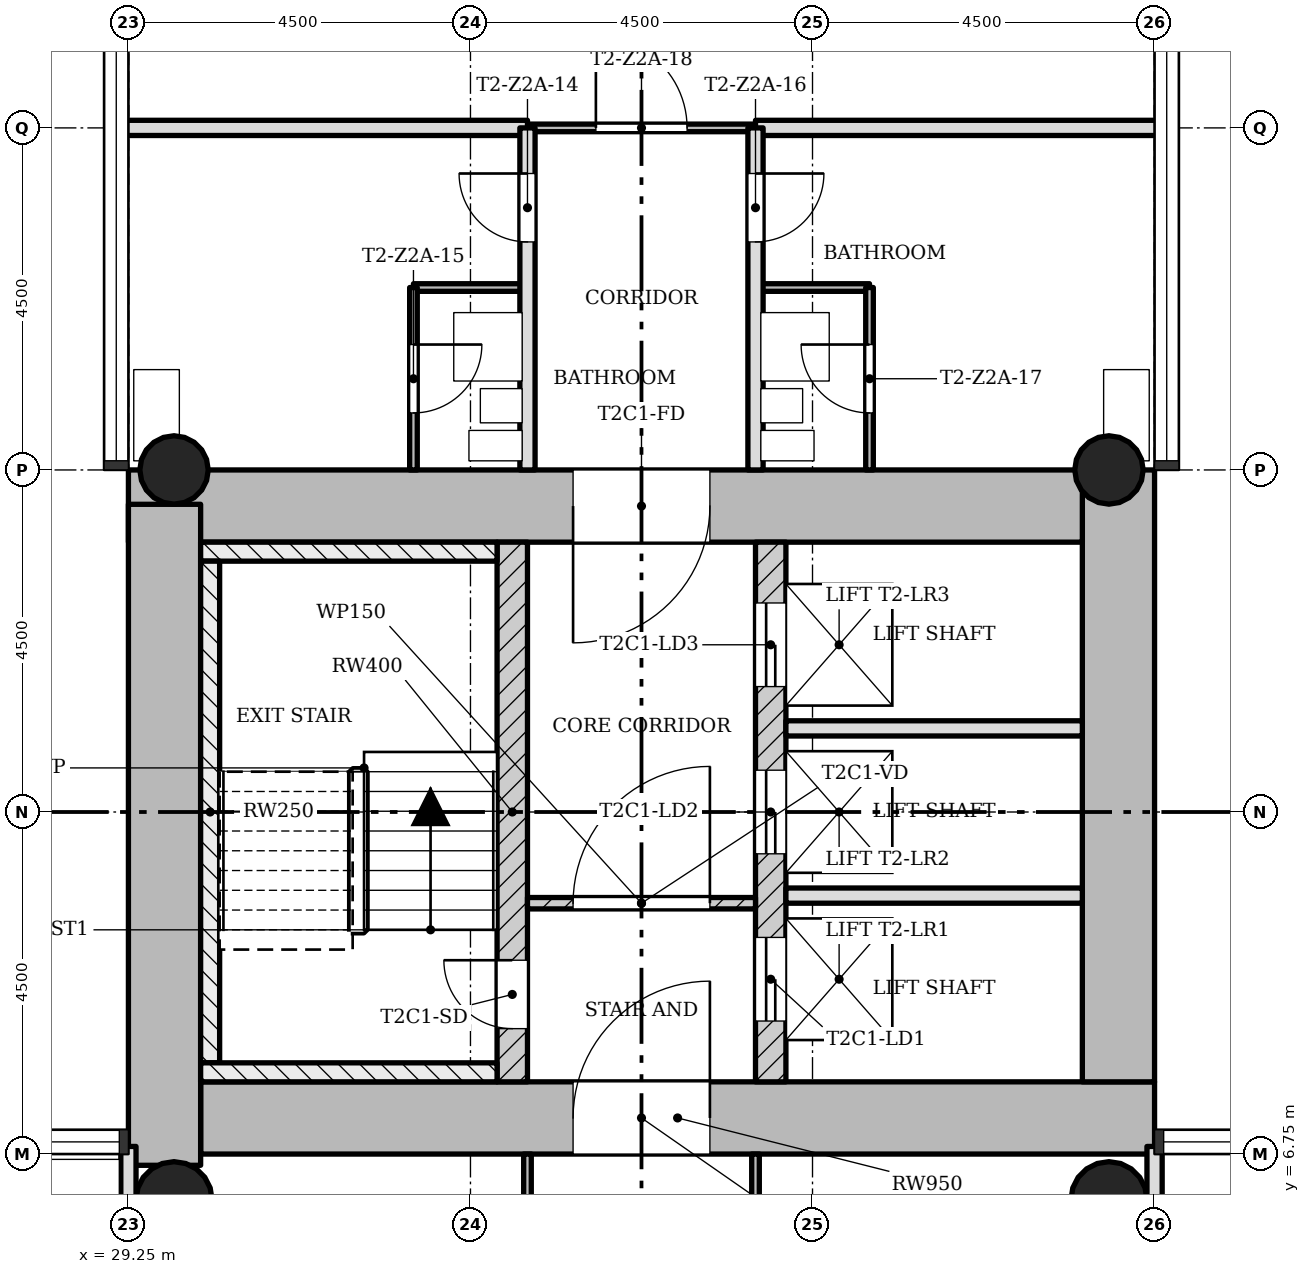
"""IFC4 building model, lengths in metres.
Left out: names, types, materials, properties, quantities, classifications, styles, units other than length and angle.
Written with IfcOpenShell. Run it as: python <this file> out.ifc"""

import sys

from ifc_helpers import new_model, si_unit, direction, frame, frame_2d, origin, origin_2d, place, context, subcontext, project, spatial, rectangle, hollow_circle, extrude, element, fill, save


model = new_model("IFC4")
c1 = context("Model", 3, precision=1e-05, world=origin(), true_north=direction((0.0, 1.0)))
c2 = subcontext(c1, "Body", "Model", "MODEL_VIEW")
j1 = project(units=[si_unit("LENGTHUNIT", "METRE"), si_unit("PLANEANGLEUNIT", "RADIAN")], contexts=[c1])
p1 = place(None, origin())
s1 = spatial("IfcSite", under=j1, at=p1, CompositionType="ELEMENT")
p2 = place(p1, origin())
s2 = spatial("IfcBuilding", under=s1, at=p2, CompositionType="ELEMENT")
p3 = place(p2, frame((0.0, 0.0, 117.4)))
s3 = spatial("IfcBuildingStorey", under=s2, at=p3, CompositionType="ELEMENT", Elevation=117.4)
p4 = place(p3, frame((30.2, 7.225, 0.0), z_axis=(0.0, 0.0, 1.0), x_axis=(1.0, 0.0, 0.0)))
e1 = element("IfcWall", 1, at=p4, inside=s3, PredefinedType="SHEAR", context=c2, shape_type="SweptSolid", body=[
    extrude(rectangle(XDim=12.55, YDim=0.95, at=frame_2d((6.275, 0.0))), origin(), (0.0, 0.0, 1.0), 3.4),
])
p5 = place(p4, frame((4.9, 0.0, 0.0)))
e2 = element("IfcOpeningElement", 2, at=p5, cuts=e1, PredefinedType="OPENING", context=c2, shape_type="SweptSolid", body=[
    extrude(rectangle(XDim=1.8, YDim=2.1, at=frame_2d((0.9, 1.05))), frame((0.0, 0.485, 0.0), z_axis=(0.0, -1.0, 0.0), x_axis=(1.0, 0.0, 0.0)), (0.0, 0.0, 1.0), 0.97),
])
p6 = place(p3, frame((42.275, 7.7, 0.0), z_axis=(0.0, 0.0, 1.0), x_axis=(0.0, 1.0, 0.0)))
e3 = element("IfcWall", 3, at=p6, inside=s3, PredefinedType="SHEAR", context=c2, shape_type="SweptSolid", body=[
    extrude(rectangle(XDim=8.05, YDim=0.95, at=frame_2d((4.025, 0.0))), origin(), (0.0, 0.0, 1.0), 3.4),
])
p7 = place(p3, frame((41.8, 15.275, 0.0), z_axis=(0.0, 0.0, 1.0), x_axis=(-1.0, 0.0, 0.0)))
e4 = element("IfcWall", 4, at=p7, inside=s3, PredefinedType="SHEAR", context=c2, shape_type="SweptSolid", body=[
    extrude(rectangle(XDim=12.55, YDim=0.95, at=frame_2d((6.275, 0.0))), origin(), (0.0, 0.0, 1.0), 3.4),
])
p8 = place(p7, frame((4.9, 0.0, 0.0)))
e5 = element("IfcOpeningElement", 5, at=p8, cuts=e4, PredefinedType="OPENING", context=c2, shape_type="SweptSolid", body=[
    extrude(rectangle(XDim=1.8, YDim=2.1, at=frame_2d((0.9, 1.05))), frame((0.0, 0.485, 0.0), z_axis=(0.0, -1.0, 0.0), x_axis=(1.0, 0.0, 0.0)), (0.0, 0.0, 1.0), 0.97),
])
p9 = place(p3, frame((29.725, 15.298, 0.0), z_axis=(0.0, 0.0, 1.0), x_axis=(0.0, -1.0, 0.0)))
e6 = element("IfcWall", 6, at=p9, inside=s3, PredefinedType="SHEAR", context=c2, shape_type="SweptSolid", body=[
    extrude(rectangle(XDim=8.696, YDim=0.95, at=frame_2d((4.348, 0.0))), origin(), (0.0, 0.0, 1.0), 3.4),
])
p10 = place(p3, frame((34.3, 7.7, 0.0), z_axis=(0.0, 0.0, 1.0), x_axis=(0.0, 1.0, 0.0)))
e7 = element("IfcWall", 7, at=p10, inside=s3, PredefinedType="SHEAR", context=c2, shape_type="SweptSolid", body=[
    extrude(rectangle(XDim=7.1, YDim=0.4, at=frame_2d((3.55, 0.0))), origin(), (0.0, 0.0, 1.0), 3.4),
])
p11 = place(p10, frame((0.7, 0.0, 0.0)))
e8 = element("IfcOpeningElement", 8, at=p11, cuts=e7, PredefinedType="OPENING", context=c2, shape_type="SweptSolid", body=[
    extrude(rectangle(XDim=0.9, YDim=2.1, at=frame_2d((0.45, 1.05))), frame((0.0, 0.21, 0.0), z_axis=(0.0, -1.0, 0.0), x_axis=(1.0, 0.0, 0.0)), (0.0, 0.0, 1.0), 0.42),
])
p12 = place(p3, frame((37.7, 7.7, 0.0), z_axis=(0.0, 0.0, 1.0), x_axis=(0.0, 1.0, 0.0)))
e9 = element("IfcWall", 9, at=p12, inside=s3, PredefinedType="SHEAR", context=c2, shape_type="SweptSolid", body=[
    extrude(rectangle(XDim=7.1, YDim=0.4, at=frame_2d((3.55, 0.0))), origin(), (0.0, 0.0, 1.0), 3.4),
])
p13 = place(p12, frame((0.8, 0.0, 0.0)))
e10 = element("IfcOpeningElement", 10, at=p13, cuts=e9, PredefinedType="OPENING", context=c2, shape_type="SweptSolid", body=[
    extrude(rectangle(XDim=1.1, YDim=2.1, at=frame_2d((0.55, 1.05))), frame((0.0, 0.21, 0.0), z_axis=(0.0, -1.0, 0.0), x_axis=(1.0, 0.0, 0.0)), (0.0, 0.0, 1.0), 0.42),
])
p14 = place(p12, frame((3.0, 0.0, 0.0)))
e11 = element("IfcOpeningElement", 11, at=p14, cuts=e9, PredefinedType="OPENING", context=c2, shape_type="SweptSolid", body=[
    extrude(rectangle(XDim=1.1, YDim=2.1, at=frame_2d((0.55, 1.05))), frame((0.0, 0.21, 0.0), z_axis=(0.0, -1.0, 0.0), x_axis=(1.0, 0.0, 0.0)), (0.0, 0.0, 1.0), 0.42),
])
p15 = place(p12, frame((5.2, 0.0, 0.0)))
e12 = element("IfcOpeningElement", 12, at=p15, cuts=e9, PredefinedType="OPENING", context=c2, shape_type="SweptSolid", body=[
    extrude(rectangle(XDim=1.1, YDim=2.1, at=frame_2d((0.55, 1.05))), frame((0.0, 0.21, 0.0), z_axis=(0.0, -1.0, 0.0), x_axis=(1.0, 0.0, 0.0)), (0.0, 0.0, 1.0), 0.42),
])
for number, where, z_axis, x_axis in (
    (13, (42.15, 15.75, 0.0), (0.0, 0.0, 1.0), (1.0, 0.0, 0.0)),
    (14, (29.85, 15.75, 0.0), (0.0, 0.0, 1.0), (1.0, 0.0, 0.0)),
):
    element("IfcColumn", number, at=place(p3, frame(where, z_axis=z_axis, x_axis=x_axis)), inside=s3, PredefinedType="COLUMN", context=c2, shape_type="SweptSolid", body=[
        extrude(hollow_circle(Radius=0.45, WallThickness=0.032, at=origin_2d()), origin(), (0.0, 0.0, 1.0), 3.4),
    ])
for number, where, z_axis, x_axis in (
    (15, (42.15, 6.15, 0.0), (0.0, 0.0, 1.0), (1.0, 0.0, 0.0)),
    (16, (29.85, 6.15, 0.0), (0.0, 0.0, 1.0), (1.0, 0.0, 0.0)),
):
    element("IfcColumn", number, at=place(p3, frame(where, z_axis=z_axis, x_axis=x_axis)), inside=s3, PredefinedType="COLUMN", context=c2, shape_type="SweptSolid", body=[
        extrude(hollow_circle(Radius=0.5, WallThickness=0.036, at=origin_2d()), origin(), (0.0, 0.0, 1.0), 3.4),
    ])
p16 = place(p3, frame((37.5, 10.05, 0.0), z_axis=(0.0, 0.0, 1.0), x_axis=(-1.0, 0.0, 0.0)))
e17 = element("IfcWall", 17, at=p16, inside=s3, PredefinedType="PARTITIONING", context=c2, shape_type="SweptSolid", body=[
    extrude(rectangle(XDim=3.0, YDim=0.15, at=frame_2d((1.5, 0.0))), origin(), (0.0, 0.0, 1.0), 3.0),
])
p17 = place(p16, frame((0.6, 0.0, 0.0)))
e18 = element("IfcOpeningElement", 18, at=p17, cuts=e17, PredefinedType="OPENING", context=c2, shape_type="SweptSolid", body=[
    extrude(rectangle(XDim=1.8, YDim=2.1, at=frame_2d((0.9, 1.05))), frame((0.0, 0.085, 0.0), z_axis=(0.0, -1.0, 0.0), x_axis=(1.0, 0.0, 0.0)), (0.0, 0.0, 1.0), 0.17),
])
for number, where, z_axis, x_axis in (
    (19, (41.8, 10.15, 0.0), (0.0, 0.0, 1.0), (-1.0, 0.0, 0.0)),
    (20, (41.8, 12.35, 0.0), (0.0, 0.0, 1.0), (-1.0, 0.0, 0.0)),
):
    element("IfcWall", number, at=place(p3, frame(where, z_axis=z_axis, x_axis=x_axis)), inside=s3, PredefinedType="SOLIDWALL", context=c2, shape_type="SweptSolid", body=[
        extrude(rectangle(XDim=3.9, YDim=0.2, at=frame_2d((1.95, 0.0))), origin(), (0.0, 0.0, 1.0), 3.0),
    ])
for number, where, z_axis, x_axis in (
    (21, (39.0, 18.15, 0.0), (0.0, 0.0, 1.0), (-1.0, 0.0, 0.0)),
    (22, (34.5, 18.15, 0.0), (0.0, 0.0, 1.0), (-1.0, 0.0, 0.0)),
):
    element("IfcWall", number, at=place(p3, frame(where, z_axis=z_axis, x_axis=x_axis)), inside=s3, PredefinedType="PARTITIONING", context=c2, shape_type="SweptSolid", body=[
        extrude(rectangle(XDim=1.5, YDim=0.1, at=frame_2d((0.75, 0.0))), origin(), (0.0, 0.0, 1.0), 3.0),
    ])
p18 = place(p3, frame((37.5, 20.25, 0.0), z_axis=(0.0, 0.0, 1.0), x_axis=(-1.0, 0.0, 0.0)))
e23 = element("IfcWall", 23, at=p18, inside=s3, PredefinedType="PARTITIONING", context=c2, shape_type="SweptSolid", body=[
    extrude(rectangle(XDim=3.0, YDim=0.1, at=frame_2d((1.5, 0.0))), origin(), (0.0, 0.0, 1.0), 3.0),
])
p19 = place(p18, frame((0.9, 0.0, 0.0)))
e24 = element("IfcOpeningElement", 24, at=p19, cuts=e23, PredefinedType="OPENING", context=c2, shape_type="SweptSolid", body=[
    extrude(rectangle(XDim=1.2, YDim=2.1, at=frame_2d((0.6, 1.05))), frame((0.0, 0.06, 0.0), z_axis=(0.0, -1.0, 0.0), x_axis=(1.0, 0.0, 0.0)), (0.0, 0.0, 1.0), 0.12),
])
for number, where, z_axis, x_axis in (
    (25, (42.85, 20.25, 0.0), (0.0, 0.0, 1.0), (-1.0, 0.0, 0.0)),
    (26, (34.5, 20.25, 0.0), (0.0, 0.0, 1.0), (-1.0, 0.0, 0.0)),
):
    element("IfcWall", number, at=place(p3, frame(where, z_axis=z_axis, x_axis=x_axis)), inside=s3, PredefinedType="SOLIDWALL", context=c2, shape_type="SweptSolid", body=[
        extrude(rectangle(XDim=5.35, YDim=0.2, at=frame_2d((2.675, 0.0))), origin(), (0.0, 0.0, 1.0), 3.0),
    ])
p20 = place(p3, frame((42.75, 0.9, 0.0), z_axis=(0.0, 0.0, 1.0), x_axis=(0.0, 1.0, 0.0)))
e27 = element("IfcWall", 27, at=p20, inside=s3, PredefinedType="SOLIDWALL", context=c2, shape_type="SweptSolid", body=[
    extrude(rectangle(XDim=5.95, YDim=0.2, at=frame_2d((2.975, 0.0))), origin(), (0.0, 0.0, 1.0), 3.0),
])
p21 = place(p3, frame((39.0, 15.75, 0.0), z_axis=(0.0, 0.0, 1.0), x_axis=(0.0, 1.0, 0.0)))
e28 = element("IfcWall", 28, at=p21, inside=s3, PredefinedType="PARTITIONING", context=c2, shape_type="SweptSolid", body=[
    extrude(rectangle(XDim=2.4, YDim=0.1, at=frame_2d((1.2, 0.0))), origin(), (0.0, 0.0, 1.0), 3.0),
])
p22 = place(p21, frame((0.75, 0.0, 0.0)))
e29 = element("IfcOpeningElement", 29, at=p22, cuts=e28, PredefinedType="OPENING", context=c2, shape_type="SweptSolid", body=[
    extrude(rectangle(XDim=0.9, YDim=2.1, at=frame_2d((0.45, 1.05))), frame((0.0, 0.06, 0.0), z_axis=(0.0, -1.0, 0.0), x_axis=(1.0, 0.0, 0.0)), (0.0, 0.0, 1.0), 0.12),
])
p23 = place(p3, frame((37.5, 0.9, 0.0), z_axis=(0.0, 0.0, 1.0), x_axis=(0.0, 1.0, 0.0)))
e30 = element("IfcWall", 30, at=p23, inside=s3, PredefinedType="PARTITIONING", context=c2, shape_type="SweptSolid", body=[
    extrude(rectangle(XDim=5.85, YDim=0.1, at=frame_2d((2.925, 0.0))), origin(), (0.0, 0.0, 1.0), 3.0),
])
p24 = place(p23, frame((2.475, 0.0, 0.0)))
e31 = element("IfcOpeningElement", 31, at=p24, cuts=e30, PredefinedType="OPENING", context=c2, shape_type="SweptSolid", body=[
    extrude(rectangle(XDim=0.9, YDim=2.1, at=frame_2d((0.45, 1.05))), frame((0.0, 0.06, 0.0), z_axis=(0.0, -1.0, 0.0), x_axis=(1.0, 0.0, 0.0)), (0.0, 0.0, 1.0), 0.12),
])
p25 = place(p3, frame((37.5, 15.75, 0.0), z_axis=(0.0, 0.0, 1.0), x_axis=(0.0, 1.0, 0.0)))
e32 = element("IfcWall", 32, at=p25, inside=s3, PredefinedType="SOLIDWALL", context=c2, shape_type="SweptSolid", body=[
    extrude(rectangle(XDim=4.5, YDim=0.2, at=frame_2d((2.25, 0.0))), origin(), (0.0, 0.0, 1.0), 3.0),
])
p26 = place(p25, frame((3.0, 0.0, 0.0)))
e33 = element("IfcOpeningElement", 33, at=p26, cuts=e32, PredefinedType="OPENING", context=c2, shape_type="SweptSolid", body=[
    extrude(rectangle(XDim=0.9, YDim=2.1, at=frame_2d((0.45, 1.05))), frame((0.0, 0.11, 0.0), z_axis=(0.0, -1.0, 0.0), x_axis=(1.0, 0.0, 0.0)), (0.0, 0.0, 1.0), 0.22),
])
p27 = place(p3, frame((34.5, 0.9, 0.0), z_axis=(0.0, 0.0, 1.0), x_axis=(0.0, 1.0, 0.0)))
e34 = element("IfcWall", 34, at=p27, inside=s3, PredefinedType="PARTITIONING", context=c2, shape_type="SweptSolid", body=[
    extrude(rectangle(XDim=5.85, YDim=0.1, at=frame_2d((2.925, 0.0))), origin(), (0.0, 0.0, 1.0), 3.0),
])
p28 = place(p27, frame((3.375, 0.0, 0.0)))
e35 = element("IfcOpeningElement", 35, at=p28, cuts=e34, PredefinedType="OPENING", context=c2, shape_type="SweptSolid", body=[
    extrude(rectangle(XDim=0.9, YDim=2.1, at=frame_2d((0.45, 1.05))), frame((0.0, 0.06, 0.0), z_axis=(0.0, -1.0, 0.0), x_axis=(1.0, 0.0, 0.0)), (0.0, 0.0, 1.0), 0.12),
])
p29 = place(p3, frame((34.5, 15.75, 0.0), z_axis=(0.0, 0.0, 1.0), x_axis=(0.0, 1.0, 0.0)))
e36 = element("IfcWall", 36, at=p29, inside=s3, PredefinedType="SOLIDWALL", context=c2, shape_type="SweptSolid", body=[
    extrude(rectangle(XDim=4.5, YDim=0.2, at=frame_2d((2.25, 0.0))), origin(), (0.0, 0.0, 1.0), 3.0),
])
p30 = place(p29, frame((3.0, 0.0, 0.0)))
e37 = element("IfcOpeningElement", 37, at=p30, cuts=e36, PredefinedType="OPENING", context=c2, shape_type="SweptSolid", body=[
    extrude(rectangle(XDim=0.9, YDim=2.1, at=frame_2d((0.45, 1.05))), frame((0.0, 0.11, 0.0), z_axis=(0.0, -1.0, 0.0), x_axis=(1.0, 0.0, 0.0)), (0.0, 0.0, 1.0), 0.22),
])
p31 = place(p3, frame((33.0, 15.75, 0.0), z_axis=(0.0, 0.0, 1.0), x_axis=(0.0, 1.0, 0.0)))
e38 = element("IfcWall", 38, at=p31, inside=s3, PredefinedType="PARTITIONING", context=c2, shape_type="SweptSolid", body=[
    extrude(rectangle(XDim=2.4, YDim=0.1, at=frame_2d((1.2, 0.0))), origin(), (0.0, 0.0, 1.0), 3.0),
])
p32 = place(p31, frame((0.75, 0.0, 0.0)))
e39 = element("IfcOpeningElement", 39, at=p32, cuts=e38, PredefinedType="OPENING", context=c2, shape_type="SweptSolid", body=[
    extrude(rectangle(XDim=0.9, YDim=2.1, at=frame_2d((0.45, 1.05))), frame((0.0, 0.06, 0.0), z_axis=(0.0, -1.0, 0.0), x_axis=(1.0, 0.0, 0.0)), (0.0, 0.0, 1.0), 0.12),
])
p33 = place(p3, frame((29.25, 0.9, 0.0), z_axis=(0.0, 0.0, 1.0), x_axis=(0.0, 1.0, 0.0)))
e40 = element("IfcWall", 40, at=p33, inside=s3, PredefinedType="SOLIDWALL", context=c2, shape_type="SweptSolid", body=[
    extrude(rectangle(XDim=5.95, YDim=0.2, at=frame_2d((2.975, 0.0))), origin(), (0.0, 0.0, 1.0), 3.0),
])
p34 = place(p3, frame((34.1, 14.675, 0.0), z_axis=(0.0, 0.0, 1.0), x_axis=(-1.0, 0.0, 0.0)))
e41 = element("IfcWall", 41, at=p34, inside=s3, PredefinedType="SHEAR", context=c2, shape_type="SweptSolid", body=[
    extrude(rectangle(XDim=3.9, YDim=0.25, at=frame_2d((1.95, 0.0))), origin(), (0.0, 0.0, 1.0), 3.4),
])
p35 = place(p3, frame((30.325, 7.95, 0.0), z_axis=(0.0, 0.0, 1.0), x_axis=(0.0, 1.0, 0.0)))
e42 = element("IfcWall", 42, at=p35, inside=s3, PredefinedType="SHEAR", context=c2, shape_type="SweptSolid", body=[
    extrude(rectangle(XDim=6.6, YDim=0.25, at=frame_2d((3.3, 0.0))), origin(), (0.0, 0.0, 1.0), 3.4),
])
p36 = place(p3, frame((34.1, 7.825, 0.0), z_axis=(0.0, 0.0, 1.0), x_axis=(-1.0, 0.0, 0.0)))
e43 = element("IfcWall", 43, at=p36, inside=s3, PredefinedType="SHEAR", context=c2, shape_type="SweptSolid", body=[
    extrude(rectangle(XDim=3.9, YDim=0.25, at=frame_2d((1.95, 0.0))), origin(), (0.0, 0.0, 1.0), 3.4),
])
p37 = place(p17, origin())
e44 = element("IfcDoor", 44, at=p37, inside=s3, OperationType="SINGLE_SWING_LEFT", PredefinedType="DOOR", context=c2, shape_type="SweptSolid", body=[
    extrude(rectangle(XDim=1.8, YDim=2.1, at=frame_2d((0.9, 1.05))), frame((0.0, 0.025, 0.0), z_axis=(0.0, -1.0, 0.0), x_axis=(1.0, 0.0, 0.0)), (0.0, 0.0, 1.0), 0.05),
])
fill(e18, e44)
p38 = place(p30, origin())
e45 = element("IfcDoor", 45, at=p38, inside=s3, OperationType="SINGLE_SWING_LEFT", PredefinedType="DOOR", context=c2, shape_type="SweptSolid", body=[
    extrude(rectangle(XDim=0.9, YDim=2.1, at=frame_2d((0.45, 1.05))), frame((0.0, 0.025, 0.0), z_axis=(0.0, -1.0, 0.0), x_axis=(1.0, 0.0, 0.0)), (0.0, 0.0, 1.0), 0.05),
])
fill(e37, e45)
p39 = place(p32, origin())
e46 = element("IfcDoor", 46, at=p39, inside=s3, OperationType="SINGLE_SWING_RIGHT", PredefinedType="DOOR", context=c2, shape_type="SweptSolid", body=[
    extrude(rectangle(XDim=0.9, YDim=2.1, at=frame_2d((0.45, 1.05))), frame((0.0, 0.025, 0.0), z_axis=(0.0, -1.0, 0.0), x_axis=(1.0, 0.0, 0.0)), (0.0, 0.0, 1.0), 0.05),
])
fill(e39, e46)
p40 = place(p26, origin())
e47 = element("IfcDoor", 47, at=p40, inside=s3, OperationType="SINGLE_SWING_RIGHT", PredefinedType="DOOR", context=c2, shape_type="SweptSolid", body=[
    extrude(rectangle(XDim=0.9, YDim=2.1, at=frame_2d((0.45, 1.05))), frame((0.0, 0.025, 0.0), z_axis=(0.0, -1.0, 0.0), x_axis=(1.0, 0.0, 0.0)), (0.0, 0.0, 1.0), 0.05),
])
fill(e33, e47)
p41 = place(p22, origin())
e48 = element("IfcDoor", 48, at=p41, inside=s3, OperationType="SINGLE_SWING_LEFT", PredefinedType="DOOR", context=c2, shape_type="SweptSolid", body=[
    extrude(rectangle(XDim=0.9, YDim=2.1, at=frame_2d((0.45, 1.05))), frame((0.0, 0.025, 0.0), z_axis=(0.0, -1.0, 0.0), x_axis=(1.0, 0.0, 0.0)), (0.0, 0.0, 1.0), 0.05),
])
fill(e29, e48)
p42 = place(p19, origin())
e49 = element("IfcDoor", 49, at=p42, inside=s3, OperationType="SINGLE_SWING_RIGHT", PredefinedType="DOOR", context=c2, shape_type="SweptSolid", body=[
    extrude(rectangle(XDim=1.2, YDim=2.1, at=frame_2d((0.6, 1.05))), frame((0.0, 0.025, 0.0), z_axis=(0.0, -1.0, 0.0), x_axis=(1.0, 0.0, 0.0)), (0.0, 0.0, 1.0), 0.05),
])
fill(e24, e49)
p43 = place(p11, origin())
e50 = element("IfcDoor", 50, at=p43, inside=s3, OperationType="SINGLE_SWING_LEFT", PredefinedType="DOOR", context=c2, shape_type="SweptSolid", body=[
    extrude(rectangle(XDim=0.9, YDim=2.1, at=frame_2d((0.45, 1.05))), frame((0.0, 0.025, 0.0), z_axis=(0.0, -1.0, 0.0), x_axis=(1.0, 0.0, 0.0)), (0.0, 0.0, 1.0), 0.05),
])
fill(e8, e50)
p44 = place(p13, origin())
e51 = element("IfcDoor", 51, at=p44, inside=s3, OperationType="SLIDING_TO_LEFT", PredefinedType="DOOR", context=c2, shape_type="SweptSolid", body=[
    extrude(rectangle(XDim=1.1, YDim=2.1, at=frame_2d((0.55, 1.05))), frame((0.0, 0.025, 0.0), z_axis=(0.0, -1.0, 0.0), x_axis=(1.0, 0.0, 0.0)), (0.0, 0.0, 1.0), 0.05),
])
fill(e10, e51)
p45 = place(p14, origin())
e52 = element("IfcDoor", 52, at=p45, inside=s3, OperationType="SLIDING_TO_LEFT", PredefinedType="DOOR", context=c2, shape_type="SweptSolid", body=[
    extrude(rectangle(XDim=1.1, YDim=2.1, at=frame_2d((0.55, 1.05))), frame((0.0, 0.025, 0.0), z_axis=(0.0, -1.0, 0.0), x_axis=(1.0, 0.0, 0.0)), (0.0, 0.0, 1.0), 0.05),
])
fill(e11, e52)
p46 = place(p15, origin())
e53 = element("IfcDoor", 53, at=p46, inside=s3, OperationType="SLIDING_TO_LEFT", PredefinedType="DOOR", context=c2, shape_type="SweptSolid", body=[
    extrude(rectangle(XDim=1.1, YDim=2.1, at=frame_2d((0.55, 1.05))), frame((0.0, 0.025, 0.0), z_axis=(0.0, -1.0, 0.0), x_axis=(1.0, 0.0, 0.0)), (0.0, 0.0, 1.0), 0.05),
])
fill(e12, e53)
p47 = place(p5, origin())
e54 = element("IfcDoor", 54, at=p47, inside=s3, OperationType="SINGLE_SWING_LEFT", PredefinedType="DOOR", context=c2, shape_type="SweptSolid", body=[
    extrude(rectangle(XDim=1.8, YDim=2.1, at=frame_2d((0.9, 1.05))), frame((0.0, 0.025, 0.0), z_axis=(0.0, -1.0, 0.0), x_axis=(1.0, 0.0, 0.0)), (0.0, 0.0, 1.0), 0.05),
])
fill(e2, e54)
p48 = place(p8, origin())
e55 = element("IfcDoor", 55, at=p48, inside=s3, OperationType="SINGLE_SWING_LEFT", PredefinedType="DOOR", context=c2, shape_type="SweptSolid", body=[
    extrude(rectangle(XDim=1.8, YDim=2.1, at=frame_2d((0.9, 1.05))), frame((0.0, 0.025, 0.0), z_axis=(0.0, -1.0, 0.0), x_axis=(1.0, 0.0, 0.0)), (0.0, 0.0, 1.0), 0.05),
])
fill(e5, e55)
save(model, sys.argv[1])
